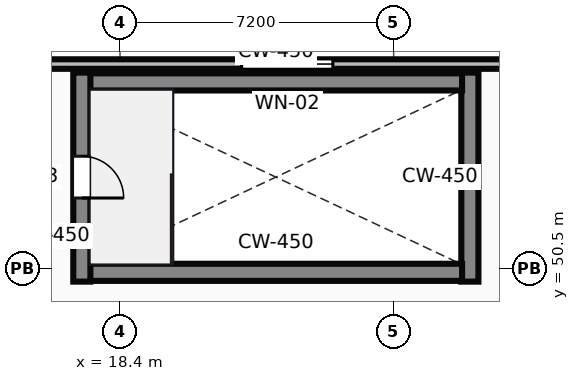
"""IFC4 building model, lengths in metres.
Left out: names, types, materials, properties, quantities, classifications, styles, units other than length and angle.
Written with IfcOpenShell. Run it as: python <this file> out.ifc"""

import sys

from ifc_helpers import new_model, si_unit, direction, frame, frame_2d, origin, place, context, subcontext, project, spatial, rectangle, extrude, source, transform, mapped, element, fill, save


model = new_model("IFC4")
c1 = context("Model", 3, precision=1e-05, world=origin(), true_north=direction((0.0, 1.0)))
c2 = subcontext(c1, "Body", "Model", "MODEL_VIEW")
j1 = project(units=[si_unit("LENGTHUNIT", "METRE"), si_unit("PLANEANGLEUNIT", "RADIAN")], contexts=[c1])
p1 = place(None, origin())
s1 = spatial("IfcSite", under=j1, at=p1, CompositionType="ELEMENT")
p2 = place(p1, origin())
s2 = spatial("IfcBuilding", under=s1, at=p2, CompositionType="ELEMENT")
p3 = place(p2, frame((0.0, 0.0, 21.0)))
s3 = spatial("IfcBuildingStorey", under=s2, at=p3, CompositionType="ELEMENT", Elevation=21.0)
m1 = source(origin(), c2, "Body", "SweptSolid", [
    extrude(rectangle(XDim=82.0, YDim=0.25, at=frame_2d((41.0, 0.0))), origin(), (0.0, 0.0, 1.0), 4.7),
])
p4 = place(p3, frame((82.0, 55.875, 0.0), z_axis=(0.0, 0.0, 1.0), x_axis=(-1.0, 0.0, 0.0)))
e1 = element("IfcWall", 1, at=p4, inside=s3, PredefinedType="STANDARD", context=c2, shape_type="MappedRepresentation", body=[
    mapped(m1, transform((0.0, 0.0, 0.0))),
])
p5 = place(p4, frame((8.0, 0.0, 0.9)))
e2 = element("IfcOpeningElement", 2, at=p5, cuts=e1, PredefinedType="OPENING", context=c2, shape_type="SweptSolid", body=[
    extrude(rectangle(XDim=2.4, YDim=2.2, at=frame_2d((1.2, 1.1))), frame((0.0, 0.135, 0.0), z_axis=(0.0, -1.0, 0.0), x_axis=(1.0, 0.0, 0.0)), (0.0, 0.0, 1.0), 0.27),
])
p6 = place(p4, frame((18.0, 0.0, 0.9)))
e3 = element("IfcOpeningElement", 3, at=p6, cuts=e1, PredefinedType="OPENING", context=c2, shape_type="SweptSolid", body=[
    extrude(rectangle(XDim=2.4, YDim=2.2, at=frame_2d((1.2, 1.1))), frame((0.0, 0.135, 0.0), z_axis=(0.0, -1.0, 0.0), x_axis=(1.0, 0.0, 0.0)), (0.0, 0.0, 1.0), 0.27),
])
p7 = place(p4, frame((28.0, 0.0, 0.9)))
e4 = element("IfcOpeningElement", 4, at=p7, cuts=e1, PredefinedType="OPENING", context=c2, shape_type="SweptSolid", body=[
    extrude(rectangle(XDim=2.4, YDim=2.2, at=frame_2d((1.2, 1.1))), frame((0.0, 0.135, 0.0), z_axis=(0.0, -1.0, 0.0), x_axis=(1.0, 0.0, 0.0)), (0.0, 0.0, 1.0), 0.27),
])
p8 = place(p4, frame((38.0, 0.0, 0.9)))
e5 = element("IfcOpeningElement", 5, at=p8, cuts=e1, PredefinedType="OPENING", context=c2, shape_type="SweptSolid", body=[
    extrude(rectangle(XDim=2.4, YDim=2.2, at=frame_2d((1.2, 1.1))), frame((0.0, 0.135, 0.0), z_axis=(0.0, -1.0, 0.0), x_axis=(1.0, 0.0, 0.0)), (0.0, 0.0, 1.0), 0.27),
])
p9 = place(p4, frame((46.5, 0.0, 0.9)))
e6 = element("IfcOpeningElement", 6, at=p9, cuts=e1, PredefinedType="OPENING", context=c2, shape_type="SweptSolid", body=[
    extrude(rectangle(XDim=2.4, YDim=2.2, at=frame_2d((1.2, 1.1))), frame((0.0, 0.135, 0.0), z_axis=(0.0, -1.0, 0.0), x_axis=(1.0, 0.0, 0.0)), (0.0, 0.0, 1.0), 0.27),
])
p10 = place(p4, frame((58.0, 0.0, 0.9)))
e7 = element("IfcOpeningElement", 7, at=p10, cuts=e1, PredefinedType="OPENING", context=c2, shape_type="SweptSolid", body=[
    extrude(rectangle(XDim=2.4, YDim=2.2, at=frame_2d((1.2, 1.1))), frame((0.0, 0.135, 0.0), z_axis=(0.0, -1.0, 0.0), x_axis=(1.0, 0.0, 0.0)), (0.0, 0.0, 1.0), 0.27),
])
p11 = place(p4, frame((66.0, 0.0, 0.9)))
e8 = element("IfcOpeningElement", 8, at=p11, cuts=e1, PredefinedType="OPENING", context=c2, shape_type="SweptSolid", body=[
    extrude(rectangle(XDim=2.4, YDim=2.2, at=frame_2d((1.2, 1.1))), frame((0.0, 0.135, 0.0), z_axis=(0.0, -1.0, 0.0), x_axis=(1.0, 0.0, 0.0)), (0.0, 0.0, 1.0), 0.27),
])
m2 = source(origin(), c2, "Body", "SweptSolid", [
    extrude(rectangle(XDim=5.5, YDim=0.45, at=frame_2d((2.75, 0.0))), origin(), (0.0, 0.0, 1.0), 4.7),
])
p12 = place(p3, frame((17.395, 50.15, 0.0), z_axis=(0.0, 0.0, 1.0), x_axis=(0.0, 1.0, 0.0)))
e9 = element("IfcWall", 9, at=p12, inside=s3, PredefinedType="SHEAR", context=c2, shape_type="MappedRepresentation", body=[
    mapped(m2, transform((0.0, 0.0, 0.0))),
])
p13 = place(p12, frame((2.2, 0.0, 0.0)))
e10 = element("IfcOpeningElement", 10, at=p13, cuts=e9, PredefinedType="OPENING", context=c2, shape_type="SweptSolid", body=[
    extrude(rectangle(XDim=1.1, YDim=2.15, at=frame_2d((0.55, 1.075))), frame((0.0, 0.235, 0.0), z_axis=(0.0, -1.0, 0.0), x_axis=(1.0, 0.0, 0.0)), (0.0, 0.0, 1.0), 0.47),
])
m3 = source(origin(), c2, "Body", "SweptSolid", [
    extrude(rectangle(XDim=9.8, YDim=0.45, at=frame_2d((4.9, 0.0))), origin(), (0.0, 0.0, 1.0), 4.7),
])
for number, where, z_axis, x_axis in (
    (11, (17.6, 50.395, 0.0), (0.0, 0.0, 1.0), (1.0, 0.0, 0.0)),
    (12, (17.6, 55.405, 0.0), (0.0, 0.0, 1.0), (1.0, 0.0, 0.0)),
):
    element("IfcWall", number, at=place(p3, frame(where, z_axis=z_axis, x_axis=x_axis)), inside=s3, PredefinedType="SHEAR", context=c2, shape_type="MappedRepresentation", body=[
        mapped(m3, transform((0.0, 0.0, 0.0))),
    ])
p14 = place(p3, frame((27.605, 50.15, 0.0), z_axis=(0.0, 0.0, 1.0), x_axis=(0.0, 1.0, 0.0)))
e13 = element("IfcWall", 13, at=p14, inside=s3, PredefinedType="SHEAR", context=c2, shape_type="MappedRepresentation", body=[
    mapped(m2, transform((0.0, 0.0, 0.0))),
])
m4 = source(origin(), c2, "Body", "SweptSolid", [
    extrude(rectangle(XDim=2.4, YDim=2.2, at=frame_2d((1.2, 1.1))), frame((0.0, 0.03, 0.0), z_axis=(0.0, -1.0, 0.0), x_axis=(1.0, 0.0, 0.0)), (0.0, 0.0, 1.0), 0.06),
])
p15 = place(p10, origin())
e14 = element("IfcWindow", 14, at=p15, inside=s3, PartitioningType="SINGLE_PANEL", PredefinedType="WINDOW", context=c2, shape_type="MappedRepresentation", body=[
    mapped(m4, transform((0.0, 0.0, 0.0))),
])
fill(e7, e14)
m5 = source(origin(), c2, "Body", "SweptSolid", [
    extrude(rectangle(XDim=1.1, YDim=2.15, at=frame_2d((0.55, 1.075))), frame((0.0, 0.025, 0.0), z_axis=(0.0, -1.0, 0.0), x_axis=(1.0, 0.0, 0.0)), (0.0, 0.0, 1.0), 0.05),
])
p16 = place(p13, frame((1.1, 0.0, 0.0), z_axis=(0.0, 0.0, 1.0), x_axis=(-1.0, 0.0, 0.0)))
e15 = element("IfcDoor", 15, at=p16, inside=s3, OperationType="SINGLE_SWING_LEFT", PredefinedType="DOOR", context=c2, shape_type="MappedRepresentation", body=[
    mapped(m5, transform((0.0, 0.0, 0.0))),
])
fill(e10, e15)
save(model, sys.argv[1])
